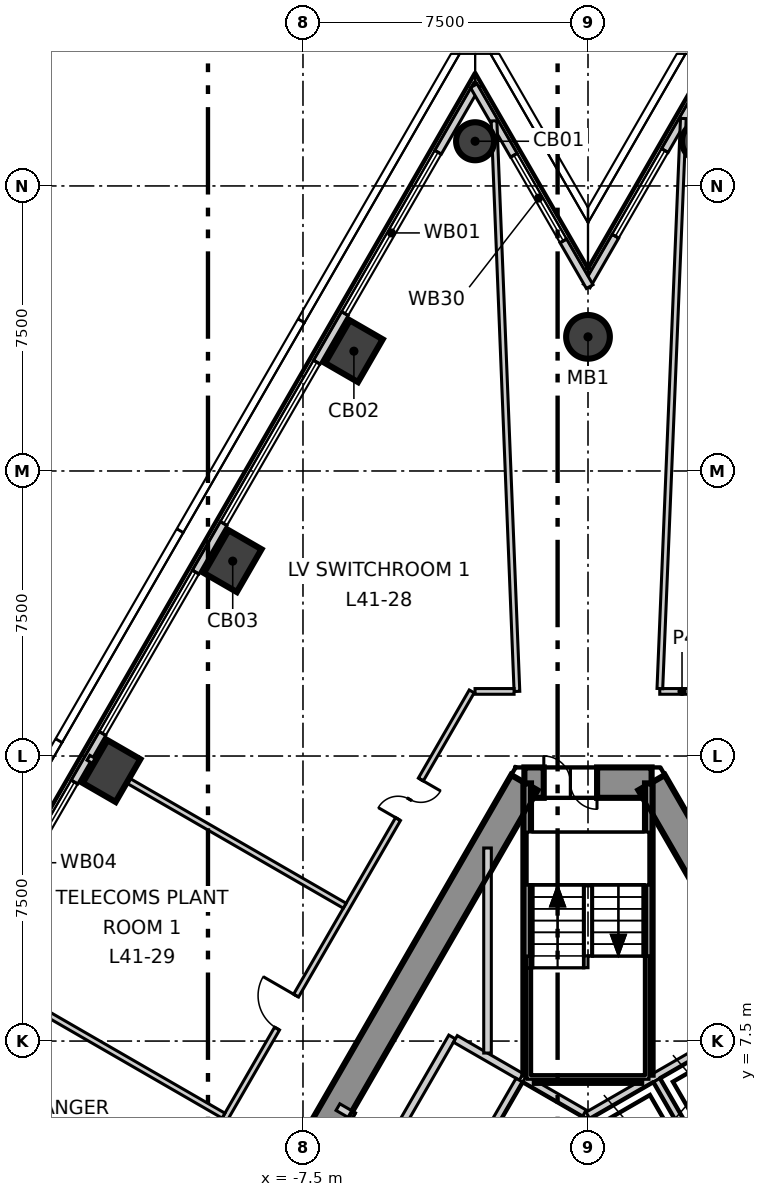
"""IFC4 building model, lengths in metres.
Left out: names, types, materials, properties, quantities, classifications, styles, units other than length and angle.
Written with IfcOpenShell. Run it as: python <this file> out.ifc"""

import sys

from ifc_helpers import new_model, si_unit, direction, frame, frame_2d, origin, origin_2d, place, context, subcontext, project, spatial, polyline, rectangle, circle, outline, extrude, element, fill, save


model = new_model("IFC4")
c1 = context("Model", 3, precision=1e-05, world=origin(), true_north=direction((0.0, 1.0)))
c2 = subcontext(c1, "Body", "Model", "MODEL_VIEW")
j1 = project(units=[si_unit("LENGTHUNIT", "METRE"), si_unit("PLANEANGLEUNIT", "RADIAN")], contexts=[c1])
p1 = place(None, origin())
s1 = spatial("IfcSite", under=j1, at=p1, CompositionType="ELEMENT")
p2 = place(p1, origin())
s2 = spatial("IfcBuilding", under=s1, at=p2, CompositionType="ELEMENT")
p3 = place(p2, frame((0.0, 0.0, 176.3)))
s3 = spatial("IfcBuildingStorey", under=s2, at=p3, CompositionType="ELEMENT", Elevation=176.3)
p4 = place(p3, frame((1.674, 14.3, -0.3), z_axis=(0.0, 0.0, 1.0), x_axis=(-1.0, 0.0, 0.0)))
e1 = element("IfcWall", 1, at=p4, inside=s3, PredefinedType="SHEAR", context=c2, shape_type="SweptSolid", body=[
    extrude(outline(polyline([(-0.231, -0.4), (1.674, -0.4), (3.579, -0.4), (3.117, 0.4), (1.674, 0.4), (0.231, 0.4), (-0.231, -0.4)])), origin(), (0.0, 0.0, 1.0), 4.2),
])
p5 = place(p4, frame((1.437, 0.0, 0.3)))
e2 = element("IfcOpeningElement", 2, at=p5, cuts=e1, PredefinedType="OPENING", context=c2, shape_type="SweptSolid", body=[
    extrude(rectangle(XDim=1.4, YDim=2.1, at=frame_2d((0.7, 1.05))), frame((0.0, 0.41, 0.0), z_axis=(0.0, -1.0, 0.0), x_axis=(1.0, 0.0, 0.0)), (0.0, 0.0, 1.0), 0.82),
])
p6 = place(p3, frame((-1.674, 14.3, -0.3), z_axis=(0.0, 0.0, 1.0), x_axis=(-0.499995765644, -0.866027848477, 0.0)))
e3 = element("IfcWall", 3, at=p6, inside=s3, PredefinedType="SHEAR", context=c2, shape_type="SweptSolid", body=[
    extrude(outline(polyline([(-0.231, -0.4), (1.732, -0.4), (3.695, -0.4), (5.658, -0.4), (7.621, -0.4), (9.584, -0.4), (11.547, -0.4), (13.51, -0.4), (15.473, -0.4), (17.436, -0.4), (19.399, -0.4), (21.362, -0.4), (23.325, -0.4), (22.863, 0.4), (20.977, 0.4), (19.091, 0.4), (17.205, 0.4), (15.319, 0.4), (13.433, 0.4), (11.547, 0.4), (9.661, 0.4), (7.775, 0.4), (5.889, 0.4), (4.003, 0.4), (2.117, 0.4), (0.231, 0.4), (-0.231, -0.4)])), origin(), (0.0, 0.0, 1.0), 4.2),
])
p7 = place(p6, frame((10.997, 0.0, 0.3)))
e4 = element("IfcOpeningElement", 4, at=p7, cuts=e3, PredefinedType="OPENING", context=c2, shape_type="SweptSolid", body=[
    extrude(rectangle(XDim=1.1, YDim=2.1, at=frame_2d((0.55, 1.05))), frame((0.0, 0.41, 0.0), z_axis=(0.0, -1.0, 0.0), x_axis=(1.0, 0.0, 0.0)), (0.0, 0.0, 1.0), 0.82),
])
p8 = place(p3, frame((13.221, -5.7, -0.3), z_axis=(0.0, 0.0, 1.0), x_axis=(-0.499995765644, 0.866027848477, 0.0)))
e5 = element("IfcWall", 5, at=p8, inside=s3, PredefinedType="SHEAR", context=c2, shape_type="SweptSolid", body=[
    extrude(outline(polyline([(-0.231, -0.4), (1.732, -0.4), (3.695, -0.4), (5.658, -0.4), (7.621, -0.4), (9.584, -0.4), (11.547, -0.4), (13.51, -0.4), (15.473, -0.4), (17.436, -0.4), (19.399, -0.4), (21.362, -0.4), (23.325, -0.4), (22.863, 0.4), (20.977, 0.4), (19.091, 0.4), (17.205, 0.4), (15.319, 0.4), (13.433, 0.4), (11.547, 0.4), (9.661, 0.4), (7.775, 0.4), (5.889, 0.4), (4.003, 0.4), (2.117, 0.4), (0.231, 0.4), (-0.231, -0.4)])), origin(), (0.0, 0.0, 1.0), 4.2),
])
p9 = place(p8, frame((10.647, 0.0, 0.3)))
e6 = element("IfcOpeningElement", 6, at=p9, cuts=e5, PredefinedType="OPENING", context=c2, shape_type="SweptSolid", body=[
    extrude(rectangle(XDim=1.8, YDim=2.1, at=frame_2d((0.9, 1.05))), frame((0.0, 0.41, 0.0), z_axis=(0.0, -1.0, 0.0), x_axis=(1.0, 0.0, 0.0)), (0.0, 0.0, 1.0), 0.82),
])
p10 = place(p3, frame((-2.971, 31.176, -0.3), z_axis=(0.0, 0.0, 1.0), x_axis=(0.5, 0.866025403784, 0.0)))
e7 = element("IfcColumn", 7, at=p10, inside=s3, PredefinedType="COLUMN", context=c2, shape_type="SweptSolid", body=[
    extrude(circle(Radius=0.5, at=origin_2d()), origin(), (0.0, 0.0, 1.0), 4.2),
])
for number, where, z_axis, x_axis in (
    (8, (-6.16, 25.652, -0.3), (0.0, 0.0, 1.0), (0.5, 0.866, 0.0)),
    (9, (-9.349, 20.128, -0.3), (0.0, 0.0, 1.0), (0.5, 0.866, 0.0)),
    (10, (-12.538, 14.604, -0.3), (0.0, 0.0, 1.0), (0.5, 0.866, 0.0)),
):
    element("IfcColumn", number, at=place(p3, frame(where, z_axis=z_axis, x_axis=x_axis)), inside=s3, PredefinedType="COLUMN", context=c2, shape_type="SweptSolid", body=[
        extrude(rectangle(XDim=1.3, YDim=1.0, at=origin_2d()), origin(), (0.0, 0.0, 1.0), 4.2),
    ])
p11 = place(p3, frame((2.971, 31.176, -0.3), z_axis=(0.0, 0.0, 1.0), x_axis=(-0.5, 0.866025403784, 0.0)))
e11 = element("IfcColumn", 11, at=p11, inside=s3, PredefinedType="COLUMN", context=c2, shape_type="SweptSolid", body=[
    extrude(circle(Radius=0.5, at=origin_2d()), origin(), (0.0, 0.0, 1.0), 4.2),
])
p12 = place(p3, frame((0.0, 26.029, -0.3), z_axis=(0.0, 0.0, 1.0), x_axis=(1.0, 0.0, 0.0)))
e12 = element("IfcColumn", 12, at=p12, inside=s3, PredefinedType="COLUMN", context=c2, shape_type="SweptSolid", body=[
    extrude(circle(Radius=0.575, at=origin_2d()), origin(), (0.0, 0.0, 1.0), 4.2),
])
p13 = place(p3, frame((-2.926, 32.654, 0.0), z_axis=(0.0, 0.0, 1.0), x_axis=(-0.499994049952, -0.866028839019, 0.0)))
e13 = element("IfcWall", 13, at=p13, inside=s3, PredefinedType="ELEMENTEDWALL", context=c2, shape_type="SweptSolid", body=[
    extrude(rectangle(XDim=53.613, YDim=0.2, at=frame_2d((26.806, 0.0))), origin(), (0.0, 0.0, 1.0), 3.9),
])
p14 = place(p13, frame((2.042, 0.0, 0.9)))
e14 = element("IfcOpeningElement", 14, at=p14, cuts=e13, PredefinedType="OPENING", context=c2, shape_type="SweptSolid", body=[
    extrude(rectangle(XDim=4.9, YDim=2.5, at=frame_2d((2.45, 1.25))), frame((0.0, 0.11, 0.0), z_axis=(0.0, -1.0, 0.0), x_axis=(1.0, 0.0, 0.0)), (0.0, 0.0, 1.0), 0.22),
])
p15 = place(p13, frame((8.42, 0.0, 0.9)))
e15 = element("IfcOpeningElement", 15, at=p15, cuts=e13, PredefinedType="OPENING", context=c2, shape_type="SweptSolid", body=[
    extrude(rectangle(XDim=4.9, YDim=2.5, at=frame_2d((2.45, 1.25))), frame((0.0, 0.11, 0.0), z_axis=(0.0, -1.0, 0.0), x_axis=(1.0, 0.0, 0.0)), (0.0, 0.0, 1.0), 0.22),
])
p16 = place(p13, frame((14.798, 0.0, 0.9)))
e16 = element("IfcOpeningElement", 16, at=p16, cuts=e13, PredefinedType="OPENING", context=c2, shape_type="SweptSolid", body=[
    extrude(rectangle(XDim=4.9, YDim=2.5, at=frame_2d((2.45, 1.25))), frame((0.0, 0.11, 0.0), z_axis=(0.0, -1.0, 0.0), x_axis=(1.0, 0.0, 0.0)), (0.0, 0.0, 1.0), 0.22),
])
p17 = place(p13, frame((21.177, 0.0, 0.9)))
e17 = element("IfcOpeningElement", 17, at=p17, cuts=e13, PredefinedType="OPENING", context=c2, shape_type="SweptSolid", body=[
    extrude(rectangle(XDim=4.9, YDim=2.5, at=frame_2d((2.45, 1.25))), frame((0.0, 0.11, 0.0), z_axis=(0.0, -1.0, 0.0), x_axis=(1.0, 0.0, 0.0)), (0.0, 0.0, 1.0), 0.22),
])
p18 = place(p13, frame((27.555, 0.0, 0.9)))
e18 = element("IfcOpeningElement", 18, at=p18, cuts=e13, PredefinedType="OPENING", context=c2, shape_type="SweptSolid", body=[
    extrude(rectangle(XDim=4.9, YDim=2.5, at=frame_2d((2.45, 1.25))), frame((0.0, 0.11, 0.0), z_axis=(0.0, -1.0, 0.0), x_axis=(1.0, 0.0, 0.0)), (0.0, 0.0, 1.0), 0.22),
])
p19 = place(p13, frame((33.934, 0.0, 0.9)))
e19 = element("IfcOpeningElement", 19, at=p19, cuts=e13, PredefinedType="OPENING", context=c2, shape_type="SweptSolid", body=[
    extrude(rectangle(XDim=4.9, YDim=2.5, at=frame_2d((2.45, 1.25))), frame((0.0, 0.11, 0.0), z_axis=(0.0, -1.0, 0.0), x_axis=(1.0, 0.0, 0.0)), (0.0, 0.0, 1.0), 0.22),
])
p20 = place(p13, frame((40.312, 0.0, 0.9)))
e20 = element("IfcOpeningElement", 20, at=p20, cuts=e13, PredefinedType="OPENING", context=c2, shape_type="SweptSolid", body=[
    extrude(rectangle(XDim=4.9, YDim=2.5, at=frame_2d((2.45, 1.25))), frame((0.0, 0.11, 0.0), z_axis=(0.0, -1.0, 0.0), x_axis=(1.0, 0.0, 0.0)), (0.0, 0.0, 1.0), 0.22),
])
p21 = place(p13, frame((46.69, 0.0, 0.9)))
e21 = element("IfcOpeningElement", 21, at=p21, cuts=e13, PredefinedType="OPENING", context=c2, shape_type="SweptSolid", body=[
    extrude(rectangle(XDim=4.9, YDim=2.5, at=frame_2d((2.45, 1.25))), frame((0.0, 0.11, 0.0), z_axis=(0.0, -1.0, 0.0), x_axis=(1.0, 0.0, 0.0)), (0.0, 0.0, 1.0), 0.22),
])
p22 = place(p3, frame((3.016, 32.654, 0.0), z_axis=(0.0, 0.0, 1.0), x_axis=(-0.499886353396, -0.86609100774, 0.0)))
e22 = element("IfcWall", 22, at=p22, inside=s3, PredefinedType="ELEMENTEDWALL", context=c2, shape_type="SweptSolid", body=[
    extrude(rectangle(XDim=6.104, YDim=0.2, at=frame_2d((3.052, 0.0))), origin(), (0.0, 0.0, 1.0), 3.9),
])
p23 = place(p22, frame((1.99, 0.0, 0.9)))
e23 = element("IfcOpeningElement", 23, at=p23, cuts=e22, PredefinedType="OPENING", context=c2, shape_type="SweptSolid", body=[
    extrude(rectangle(XDim=2.6, YDim=2.5, at=frame_2d((1.3, 1.25))), frame((0.0, 0.11, 0.0), z_axis=(0.0, -1.0, 0.0), x_axis=(1.0, 0.0, 0.0)), (0.0, 0.0, 1.0), 0.22),
])
p24 = place(p3, frame((0.045, 27.351, 0.0), z_axis=(0.0, 0.0, 1.0), x_axis=(-0.499903671999, 0.866081011639, 0.0)))
e24 = element("IfcWall", 24, at=p24, inside=s3, PredefinedType="ELEMENTEDWALL", context=c2, shape_type="SweptSolid", body=[
    extrude(rectangle(XDim=6.103, YDim=0.2, at=frame_2d((3.052, 0.0))), origin(), (0.0, 0.0, 1.0), 3.9),
])
p25 = place(p24, frame((1.39, 0.0, 0.9)))
e25 = element("IfcOpeningElement", 25, at=p25, cuts=e24, PredefinedType="OPENING", context=c2, shape_type="SweptSolid", body=[
    extrude(rectangle(XDim=2.6, YDim=2.5, at=frame_2d((1.3, 1.25))), frame((0.0, 0.11, 0.0), z_axis=(0.0, -1.0, 0.0), x_axis=(1.0, 0.0, 0.0)), (0.0, 0.0, 1.0), 0.22),
])
p26 = place(p3, frame((-15.993, -5.7, 0.0), z_axis=(0.0, 0.0, 1.0), x_axis=(0.500007877715, 0.866020855536, 0.0)))
e26 = element("IfcWall", 26, at=p26, inside=s3, PredefinedType="PARTITIONING", context=c2, shape_type="SweptSolid", body=[
    extrude(rectangle(XDim=25.865, YDim=0.15, at=frame_2d((12.933, 0.0))), origin(), (0.0, 0.0, 1.0), 3.9),
])
p27 = place(p26, frame((21.988, 0.0, 0.0)))
e27 = element("IfcOpeningElement", 27, at=p27, cuts=e26, PredefinedType="OPENING", context=c2, shape_type="SweptSolid", body=[
    extrude(rectangle(XDim=1.2, YDim=2.1, at=frame_2d((0.6, 1.05))), frame((0.0, 0.085, 0.0), z_axis=(0.0, -1.0, 0.0), x_axis=(1.0, 0.0, 0.0)), (0.0, 0.0, 1.0), 0.17),
])
p28 = place(p26, frame((15.622, 0.0, 0.0)))
e28 = element("IfcOpeningElement", 28, at=p28, cuts=e26, PredefinedType="OPENING", context=c2, shape_type="SweptSolid", body=[
    extrude(rectangle(XDim=1.0, YDim=2.1, at=frame_2d((0.5, 1.05))), frame((0.0, 0.085, 0.0), z_axis=(0.0, -1.0, 0.0), x_axis=(1.0, 0.0, 0.0)), (0.0, 0.0, 1.0), 0.17),
])
p29 = place(p26, frame((9.244, 0.0, 0.0)))
e29 = element("IfcOpeningElement", 29, at=p29, cuts=e26, PredefinedType="OPENING", context=c2, shape_type="SweptSolid", body=[
    extrude(rectangle(XDim=1.0, YDim=2.1, at=frame_2d((0.5, 1.05))), frame((0.0, 0.085, 0.0), z_axis=(0.0, -1.0, 0.0), x_axis=(1.0, 0.0, 0.0)), (0.0, 0.0, 1.0), 0.17),
])
p30 = place(p26, frame((2.678, 0.0, 0.0)))
e30 = element("IfcOpeningElement", 30, at=p30, cuts=e26, PredefinedType="OPENING", context=c2, shape_type="SweptSolid", body=[
    extrude(rectangle(XDim=1.2, YDim=2.1, at=frame_2d((0.6, 1.05))), frame((0.0, 0.085, 0.0), z_axis=(0.0, -1.0, 0.0), x_axis=(1.0, 0.0, 0.0)), (0.0, 0.0, 1.0), 0.17),
])
p31 = place(p3, frame((-16.334, 9.43, 0.0), z_axis=(0.0, 0.0, 1.0), x_axis=(0.86603676932, -0.499980313799, 0.0)))
e31 = element("IfcWall", 31, at=p31, inside=s3, PredefinedType="PARTITIONING", context=c2, shape_type="SweptSolid", body=[
    extrude(rectangle(XDim=7.786, YDim=0.15, at=frame_2d((3.893, 0.0))), origin(), (0.0, 0.0, 1.0), 3.4),
])
p32 = place(p3, frame((-13.145, 14.954, 0.0), z_axis=(0.0, 0.0, 1.0), x_axis=(0.866023191782, -0.500003831281, 0.0)))
e32 = element("IfcWall", 32, at=p32, inside=s3, PredefinedType="PARTITIONING", context=c2, shape_type="SweptSolid", body=[
    extrude(rectangle(XDim=7.786, YDim=0.15, at=frame_2d((3.893, 0.0))), origin(), (0.0, 0.0, 1.0), 3.9),
])
p33 = place(p3, frame((-2.473, 31.713, 0.0), z_axis=(0.0, 0.0, 1.0), x_axis=(0.040118587007, -0.999194925416, 0.0)))
e33 = element("IfcWall", 33, at=p33, inside=s3, PredefinedType="PARTITIONING", context=c2, shape_type="SweptSolid", body=[
    extrude(rectangle(XDim=15.025, YDim=0.15, at=frame_2d((7.513, 0.0))), origin(), (0.0, 0.0, 1.0), 3.2),
])
p34 = place(p3, frame((-2.973, 16.7, 0.0), z_axis=(0.0, 0.0, 1.0), x_axis=(1.0, 0.0, 0.0)))
e34 = element("IfcWall", 34, at=p34, inside=s3, PredefinedType="PARTITIONING", context=c2, shape_type="SweptSolid", body=[
    extrude(rectangle(XDim=1.028, YDim=0.15, at=frame_2d((0.514, 0.0))), origin(), (0.0, 0.0, 1.0), 3.9),
])
p35 = place(p3, frame((1.888, 16.7, 0.0), z_axis=(0.0, 0.0, 1.0), x_axis=(1.0, 0.0, 0.0)))
e35 = element("IfcWall", 35, at=p35, inside=s3, PredefinedType="PARTITIONING", context=c2, shape_type="SweptSolid", body=[
    extrude(rectangle(XDim=1.172, YDim=0.15, at=frame_2d((0.586, 0.0))), origin(), (0.0, 0.0, 1.0), 3.9),
])
p36 = place(p3, frame((1.891, 16.775, 0.0), z_axis=(0.0, 0.0, 1.0), x_axis=(0.04115975221, 0.999152578337, 0.0)))
e36 = element("IfcWall", 36, at=p36, inside=s3, PredefinedType="PARTITIONING", context=c2, shape_type="SweptSolid", body=[
    extrude(rectangle(XDim=15.013, YDim=0.15, at=frame_2d((7.506, 0.0))), origin(), (0.0, 0.0, 1.0), 3.2),
])
p37 = place(p3, frame((-0.002, 5.542, 0.0), z_axis=(0.0, 0.0, 1.0), x_axis=(0.866103910842, 0.499863997127, 0.0)))
e37 = element("IfcWall", 37, at=p37, inside=s3, PredefinedType="SOLIDWALL", context=c2, shape_type="SweptSolid", body=[
    extrude(rectangle(XDim=4.131, YDim=0.2, at=frame_2d((2.065, 0.0))), origin(), (0.0, 0.0, 1.0), 3.9),
])
p38 = place(p3, frame((1.577, 2.874, 0.0), z_axis=(0.0, 0.0, 1.0), x_axis=(0.866073694534, 0.499916348638, 0.0)))
e38 = element("IfcWall", 38, at=p38, inside=s3, PredefinedType="SOLIDWALL", context=c2, shape_type="SweptSolid", body=[
    extrude(rectangle(XDim=5.777, YDim=0.2, at=frame_2d((2.888, 0.0))), origin(), (0.0, 0.0, 1.0), 3.9),
])
p39 = place(p38, frame((4.399, 0.0, 0.0)))
e39 = element("IfcOpeningElement", 39, at=p39, cuts=e38, PredefinedType="OPENING", context=c2, shape_type="SweptSolid", body=[
    extrude(rectangle(XDim=0.9, YDim=2.1, at=frame_2d((0.45, 1.05))), frame((0.0, 0.11, 0.0), z_axis=(0.0, -1.0, 0.0), x_axis=(1.0, 0.0, 0.0)), (0.0, 0.0, 1.0), 0.22),
])
p40 = place(p3, frame((1.807, 6.47, 0.0), z_axis=(0.0, 0.0, 1.0), x_axis=(0.50012328804, -0.865954211699, 0.0)))
e40 = element("IfcWall", 40, at=p40, inside=s3, PredefinedType="SOLIDWALL", context=c2, shape_type="SweptSolid", body=[
    extrude(rectangle(XDim=2.9, YDim=0.2, at=frame_2d((1.45, 0.0))), origin(), (0.0, 0.0, 1.0), 3.9),
])
p41 = place(p3, frame((-6.58, 5.762, 0.0), z_axis=(0.0, 0.0, 1.0), x_axis=(0.866029704776, -0.49999255039, 0.0)))
e41 = element("IfcWall", 41, at=p41, inside=s3, PredefinedType="SOLIDWALL", context=c2, shape_type="SweptSolid", body=[
    extrude(rectangle(XDim=3.782, YDim=0.2, at=frame_2d((1.891, 0.0))), origin(), (0.0, 0.0, 1.0), 3.9),
])
p42 = place(p41, frame((2.279, 0.0, 0.0)))
e42 = element("IfcOpeningElement", 42, at=p42, cuts=e41, PredefinedType="OPENING", context=c2, shape_type="SweptSolid", body=[
    extrude(rectangle(XDim=0.9, YDim=2.1, at=frame_2d((0.45, 1.05))), frame((0.0, 0.11, 0.0), z_axis=(0.0, -1.0, 0.0), x_axis=(1.0, 0.0, 0.0)), (0.0, 0.0, 1.0), 0.22),
])
p43 = place(p41, frame((0.479, 0.0, 0.0)))
e43 = element("IfcOpeningElement", 43, at=p43, cuts=e41, PredefinedType="OPENING", context=c2, shape_type="SweptSolid", body=[
    extrude(rectangle(XDim=0.9, YDim=2.1, at=frame_2d((0.45, 1.05))), frame((0.0, 0.11, 0.0), z_axis=(0.0, -1.0, 0.0), x_axis=(1.0, 0.0, 0.0)), (0.0, 0.0, 1.0), 0.22),
])
p44 = place(p3, frame((-5.076, 5.009, 0.0), z_axis=(0.0, 0.0, 1.0), x_axis=(0.50002537861, 0.866010750942, 0.0)))
e44 = element("IfcWall", 44, at=p44, inside=s3, PredefinedType="SOLIDWALL", context=c2, shape_type="SweptSolid", body=[
    extrude(rectangle(XDim=3.0, YDim=0.2, at=frame_2d((1.5, 0.0))), origin(), (0.0, 0.0, 1.0), 3.9),
])
p45 = place(p3, frame((-3.489, 7.557, 0.0), z_axis=(0.0, 0.0, 1.0), x_axis=(0.866010750942, -0.50002537861, 0.0)))
e45 = element("IfcWall", 45, at=p45, inside=s3, PredefinedType="SOLIDWALL", context=c2, shape_type="SweptSolid", body=[
    extrude(rectangle(XDim=2.0, YDim=0.2, at=frame_2d((1.0, 0.0))), origin(), (0.0, 0.0, 1.0), 3.9),
])
p46 = place(p3, frame((-3.257, 3.959, 0.0), z_axis=(0.0, 0.0, 1.0), x_axis=(0.50012328804, 0.865954211699, 0.0)))
e46 = element("IfcWall", 46, at=p46, inside=s3, PredefinedType="SOLIDWALL", context=c2, shape_type="SweptSolid", body=[
    extrude(rectangle(XDim=2.9, YDim=0.2, at=frame_2d((1.45, 0.0))), origin(), (0.0, 0.0, 1.0), 3.9),
])
p47 = place(p3, frame((-1.67, 6.507, 0.0), z_axis=(0.0, 0.0, 1.0), x_axis=(0.865941441609, -0.500145398563, 0.0)))
e47 = element("IfcWall", 47, at=p47, inside=s3, PredefinedType="SOLIDWALL", context=c2, shape_type="SweptSolid", body=[
    extrude(rectangle(XDim=1.815, YDim=0.2, at=frame_2d((0.908, 0.0))), origin(), (0.0, 0.0, 1.0), 3.9),
])
p48 = place(p3, frame((-2.644, 7.185, 0.0), z_axis=(0.0, 0.0, 1.0), x_axis=(0.0, 1.0, 0.0)))
e48 = element("IfcWall", 48, at=p48, inside=s3, PredefinedType="SOLIDWALL", context=c2, shape_type="SweptSolid", body=[
    extrude(rectangle(XDim=5.395, YDim=0.2, at=frame_2d((2.698, 0.0))), origin(), (0.0, 0.0, 1.0), 3.35),
])
p49 = place(p3, frame((1.6, 6.615, 0.0), z_axis=(0.0, 0.0, 1.0), x_axis=(0.0, 1.0, 0.0)))
e49 = element("IfcWall", 49, at=p49, inside=s3, PredefinedType="SOLIDWALL", context=c2, shape_type="SweptSolid", body=[
    extrude(rectangle(XDim=7.665, YDim=0.2, at=frame_2d((3.833, 0.0))), origin(), (0.0, 0.0, 1.0), 3.9),
])
p50 = place(p3, frame((-1.4, 6.5, 0.0), z_axis=(0.0, 0.0, 1.0), x_axis=(1.0, 0.0, 0.0)))
e50 = element("IfcWall", 50, at=p50, inside=s3, PredefinedType="SOLIDWALL", context=c2, shape_type="SweptSolid", body=[
    extrude(rectangle(XDim=2.8, YDim=0.2, at=frame_2d((1.4, 0.0))), origin(), (0.0, 0.0, 1.0), 3.9),
])
p51 = place(p3, frame((-1.6, 6.615, 0.0), z_axis=(0.0, 0.0, 1.0), x_axis=(0.0, 1.0, 0.0)))
e51 = element("IfcWall", 51, at=p51, inside=s3, PredefinedType="SOLIDWALL", context=c2, shape_type="SweptSolid", body=[
    extrude(rectangle(XDim=7.665, YDim=0.2, at=frame_2d((3.833, 0.0))), origin(), (0.0, 0.0, 1.0), 3.9),
])
p52 = place(p14, origin())
e52 = element("IfcWindow", 52, at=p52, inside=s3, PartitioningType="SINGLE_PANEL", PredefinedType="WINDOW", context=c2, shape_type="SweptSolid", body=[
    extrude(rectangle(XDim=4.9, YDim=2.5, at=frame_2d((2.45, 1.25))), frame((0.0, 0.03, 0.0), z_axis=(0.0, -1.0, 0.0), x_axis=(1.0, 0.0, 0.0)), (0.0, 0.0, 1.0), 0.06),
])
fill(e14, e52)
p53 = place(p15, origin())
e53 = element("IfcWindow", 53, at=p53, inside=s3, PartitioningType="SINGLE_PANEL", PredefinedType="WINDOW", context=c2, shape_type="SweptSolid", body=[
    extrude(rectangle(XDim=4.9, YDim=2.5, at=frame_2d((2.45, 1.25))), frame((0.0, 0.03, 0.0), z_axis=(0.0, -1.0, 0.0), x_axis=(1.0, 0.0, 0.0)), (0.0, 0.0, 1.0), 0.06),
])
fill(e15, e53)
p54 = place(p16, origin())
e54 = element("IfcWindow", 54, at=p54, inside=s3, PartitioningType="SINGLE_PANEL", PredefinedType="WINDOW", context=c2, shape_type="SweptSolid", body=[
    extrude(rectangle(XDim=4.9, YDim=2.5, at=frame_2d((2.45, 1.25))), frame((0.0, 0.03, 0.0), z_axis=(0.0, -1.0, 0.0), x_axis=(1.0, 0.0, 0.0)), (0.0, 0.0, 1.0), 0.06),
])
fill(e16, e54)
p55 = place(p17, origin())
e55 = element("IfcWindow", 55, at=p55, inside=s3, PartitioningType="SINGLE_PANEL", PredefinedType="WINDOW", context=c2, shape_type="SweptSolid", body=[
    extrude(rectangle(XDim=4.9, YDim=2.5, at=frame_2d((2.45, 1.25))), frame((0.0, 0.03, 0.0), z_axis=(0.0, -1.0, 0.0), x_axis=(1.0, 0.0, 0.0)), (0.0, 0.0, 1.0), 0.06),
])
fill(e17, e55)
p56 = place(p23, origin())
e56 = element("IfcWindow", 56, at=p56, inside=s3, PartitioningType="SINGLE_PANEL", PredefinedType="WINDOW", context=c2, shape_type="SweptSolid", body=[
    extrude(rectangle(XDim=2.6, YDim=2.5, at=frame_2d((1.3, 1.25))), frame((0.0, 0.03, 0.0), z_axis=(0.0, -1.0, 0.0), x_axis=(1.0, 0.0, 0.0)), (0.0, 0.0, 1.0), 0.06),
])
fill(e23, e56)
p57 = place(p25, origin())
e57 = element("IfcWindow", 57, at=p57, inside=s3, PartitioningType="SINGLE_PANEL", PredefinedType="WINDOW", context=c2, shape_type="SweptSolid", body=[
    extrude(rectangle(XDim=2.6, YDim=2.5, at=frame_2d((1.3, 1.25))), frame((0.0, 0.03, 0.0), z_axis=(0.0, -1.0, 0.0), x_axis=(1.0, 0.0, 0.0)), (0.0, 0.0, 1.0), 0.06),
])
fill(e25, e57)
p58 = place(p27, origin())
e58 = element("IfcDoor", 58, at=p58, inside=s3, OperationType="DOUBLE_DOOR_SINGLE_SWING", PredefinedType="DOOR", context=c2, shape_type="SweptSolid", body=[
    extrude(rectangle(XDim=1.2, YDim=2.1, at=frame_2d((0.6, 1.05))), frame((0.0, 0.025, 0.0), z_axis=(0.0, -1.0, 0.0), x_axis=(1.0, 0.0, 0.0)), (0.0, 0.0, 1.0), 0.05),
])
fill(e27, e58)
p59 = place(p28, origin())
e59 = element("IfcDoor", 59, at=p59, inside=s3, OperationType="SINGLE_SWING_LEFT", PredefinedType="DOOR", context=c2, shape_type="SweptSolid", body=[
    extrude(rectangle(XDim=1.0, YDim=2.1, at=frame_2d((0.5, 1.05))), frame((0.0, 0.025, 0.0), z_axis=(0.0, -1.0, 0.0), x_axis=(1.0, 0.0, 0.0)), (0.0, 0.0, 1.0), 0.05),
])
fill(e28, e59)
p60 = place(p5, origin())
e60 = element("IfcDoor", 60, at=p60, inside=s3, OperationType="DOUBLE_DOOR_SINGLE_SWING", PredefinedType="DOOR", context=c2, shape_type="SweptSolid", body=[
    extrude(rectangle(XDim=1.4, YDim=2.1, at=frame_2d((0.7, 1.05))), frame((0.0, 0.025, 0.0), z_axis=(0.0, -1.0, 0.0), x_axis=(1.0, 0.0, 0.0)), (0.0, 0.0, 1.0), 0.05),
])
fill(e2, e60)
p61 = place(p43, origin())
e61 = element("IfcDoor", 61, at=p61, inside=s3, OperationType="SINGLE_SWING_LEFT", PredefinedType="DOOR", context=c2, shape_type="SweptSolid", body=[
    extrude(rectangle(XDim=0.9, YDim=2.1, at=frame_2d((0.45, 1.05))), frame((0.0, 0.025, 0.0), z_axis=(0.0, -1.0, 0.0), x_axis=(1.0, 0.0, 0.0)), (0.0, 0.0, 1.0), 0.05),
])
fill(e43, e61)
save(model, sys.argv[1])
